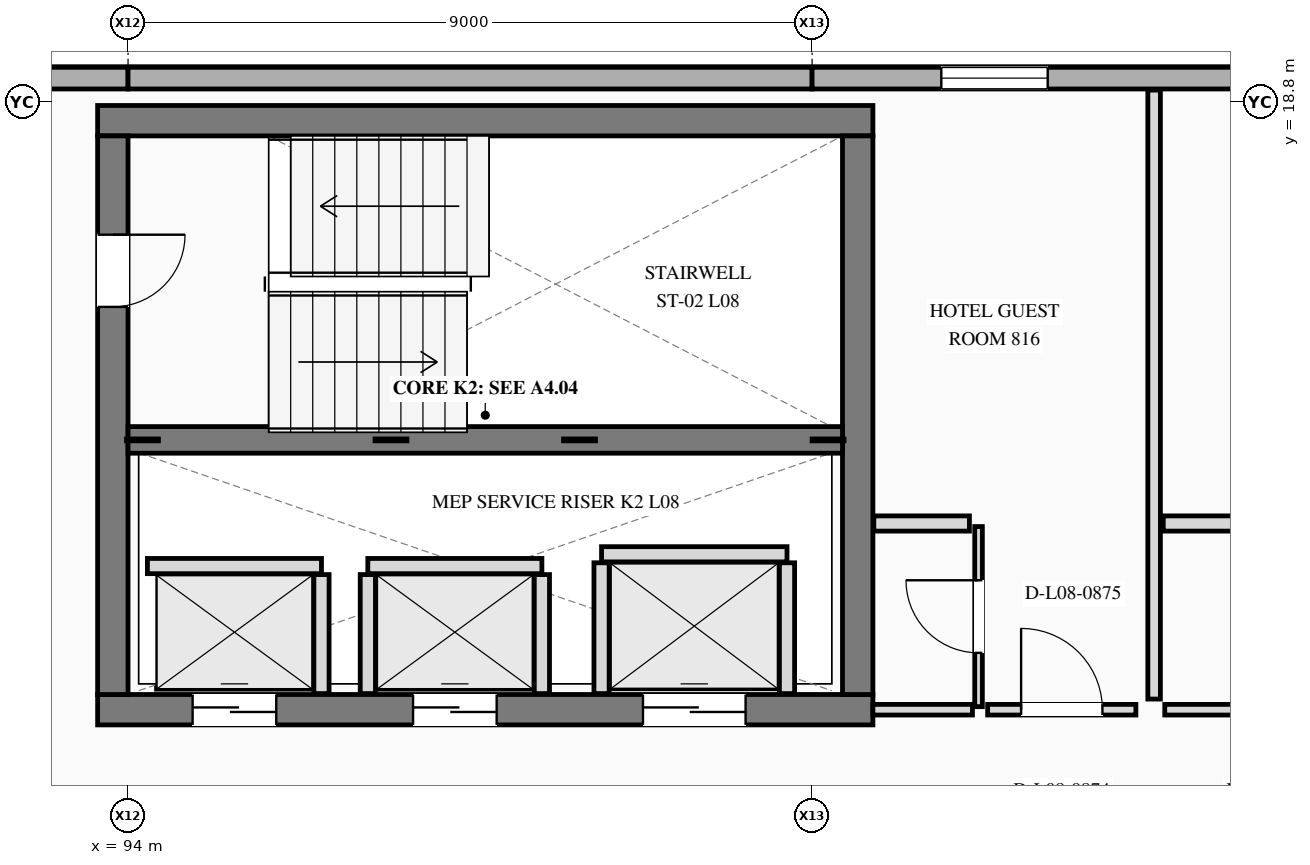
"""IFC4 building model, lengths in metres.
Left out: names, types, materials, properties, quantities, classifications, styles, units other than length and angle.
Written with IfcOpenShell. Run it as: python <this file> out.ifc"""

import sys

from ifc_helpers import new_model, si_unit, direction, frame, frame_2d, origin, place, context, subcontext, project, spatial, rectangle, extrude, element, fill, save


model = new_model("IFC4")
c1 = context("Model", 3, precision=1e-05, world=origin(), true_north=direction((0.0, 1.0)))
c2 = subcontext(c1, "Body", "Model", "MODEL_VIEW")
j1 = project(units=[si_unit("LENGTHUNIT", "METRE"), si_unit("PLANEANGLEUNIT", "RADIAN")], contexts=[c1])
p1 = place(None, origin())
s1 = spatial("IfcSite", under=j1, at=p1, CompositionType="ELEMENT")
p2 = place(p1, origin())
s2 = spatial("IfcBuilding", under=s1, at=p2, CompositionType="ELEMENT")
p3 = place(p2, frame((0.0, 0.0, 34.1)))
s3 = spatial("IfcBuildingStorey", under=s2, at=p3, CompositionType="ELEMENT", Elevation=34.1)
for number, where, z_axis, x_axis in (
    (1, (94.0, 19.11, 0.0), (0.0, 0.0, 1.0), (-1.0, 0.0, 0.0)),
    (2, (103.0, 19.11, 0.0), (0.0, 0.0, 1.0), (-1.0, 0.0, 0.0)),
):
    element("IfcWall", number, at=place(p3, frame(where, z_axis=z_axis, x_axis=x_axis)), inside=s3, PredefinedType="STANDARD", context=c2, shape_type="SweptSolid", body=[
        extrude(rectangle(XDim=9.0, YDim=0.285, at=frame_2d((4.5, 0.0))), origin(), (0.0, 0.0, 1.0), 3.5),
    ])
p4 = place(p3, frame((112.0, 19.11, 0.0), z_axis=(0.0, 0.0, 1.0), x_axis=(-1.0, 0.0, 0.0)))
e3 = element("IfcWall", 3, at=p4, inside=s3, PredefinedType="STANDARD", context=c2, shape_type="SweptSolid", body=[
    extrude(rectangle(XDim=9.0, YDim=0.285, at=frame_2d((4.5, 0.0))), origin(), (0.0, 0.0, 1.0), 3.5),
])
p5 = place(p4, frame((5.9, 0.0, 0.85)))
e4 = element("IfcOpeningElement", 4, at=p5, cuts=e3, PredefinedType="OPENING", context=c2, shape_type="SweptSolid", body=[
    extrude(rectangle(XDim=1.4, YDim=1.55, at=frame_2d((0.7, 0.775))), frame((0.0, 0.152, 0.0), z_axis=(0.0, -1.0, 0.0), x_axis=(1.0, 0.0, 0.0)), (0.0, 0.0, 1.0), 0.305),
])
p6 = place(p4, frame((1.725, 0.0, 0.85)))
e5 = element("IfcOpeningElement", 5, at=p6, cuts=e3, PredefinedType="OPENING", context=c2, shape_type="SweptSolid", body=[
    extrude(rectangle(XDim=1.35, YDim=1.65, at=frame_2d((0.675, 0.825))), frame((0.0, 0.152, 0.0), z_axis=(0.0, -1.0, 0.0), x_axis=(1.0, 0.0, 0.0)), (0.0, 0.0, 1.0), 0.305),
])
p7 = place(p3, frame((93.6, 10.8, 0.0), z_axis=(0.0, 0.0, 1.0), x_axis=(1.0, 0.0, 0.0)))
e6 = element("IfcWall", 6, at=p7, inside=s3, PredefinedType="SHEAR", context=c2, shape_type="SweptSolid", body=[
    extrude(rectangle(XDim=10.2, YDim=0.4, at=frame_2d((5.1, 0.0))), origin(), (0.0, 0.0, 1.0), 3.5),
])
p8 = place(p7, frame((1.25, 0.0, 0.0)))
e7 = element("IfcOpeningElement", 7, at=p8, cuts=e6, PredefinedType="OPENING", context=c2, shape_type="SweptSolid", body=[
    extrude(rectangle(XDim=1.1, YDim=2.2, at=frame_2d((0.55, 1.1))), frame((0.0, 0.21, 0.0), z_axis=(0.0, -1.0, 0.0), x_axis=(1.0, 0.0, 0.0)), (0.0, 0.0, 1.0), 0.42),
])
p9 = place(p7, frame((4.15, 0.0, 0.0)))
e8 = element("IfcOpeningElement", 8, at=p9, cuts=e6, PredefinedType="OPENING", context=c2, shape_type="SweptSolid", body=[
    extrude(rectangle(XDim=1.1, YDim=2.2, at=frame_2d((0.55, 1.1))), frame((0.0, 0.21, 0.0), z_axis=(0.0, -1.0, 0.0), x_axis=(1.0, 0.0, 0.0)), (0.0, 0.0, 1.0), 0.42),
])
p10 = place(p7, frame((7.175, 0.0, 0.0)))
e9 = element("IfcOpeningElement", 9, at=p10, cuts=e6, PredefinedType="OPENING", context=c2, shape_type="SweptSolid", body=[
    extrude(rectangle(XDim=1.35, YDim=2.3, at=frame_2d((0.675, 1.15))), frame((0.0, 0.21, 0.0), z_axis=(0.0, -1.0, 0.0), x_axis=(1.0, 0.0, 0.0)), (0.0, 0.0, 1.0), 0.42),
])
p11 = place(p3, frame((103.8, 18.55, 0.0), z_axis=(0.0, 0.0, 1.0), x_axis=(-1.0, 0.0, 0.0)))
e10 = element("IfcWall", 10, at=p11, inside=s3, PredefinedType="SHEAR", context=c2, shape_type="SweptSolid", body=[
    extrude(rectangle(XDim=10.2, YDim=0.4, at=frame_2d((5.1, 0.0))), origin(), (0.0, 0.0, 1.0), 3.5),
])
p12 = place(p3, frame((93.8, 18.35, 0.0), z_axis=(0.0, 0.0, 1.0), x_axis=(0.0, -1.0, 0.0)))
e11 = element("IfcWall", 11, at=p12, inside=s3, PredefinedType="SHEAR", context=c2, shape_type="SweptSolid", body=[
    extrude(rectangle(XDim=7.35, YDim=0.4, at=frame_2d((3.675, 0.0))), origin(), (0.0, 0.0, 1.0), 3.5),
])
p13 = place(p12, frame((1.3, 0.0, 0.0)))
e12 = element("IfcOpeningElement", 12, at=p13, cuts=e11, PredefinedType="OPENING", context=c2, shape_type="SweptSolid", body=[
    extrude(rectangle(XDim=0.95, YDim=2.2, at=frame_2d((0.475, 1.1))), frame((0.0, 0.21, 0.0), z_axis=(0.0, -1.0, 0.0), x_axis=(1.0, 0.0, 0.0)), (0.0, 0.0, 1.0), 0.42),
])
p14 = place(p3, frame((103.6, 11.0, 0.0), z_axis=(0.0, 0.0, 1.0), x_axis=(0.0, 1.0, 0.0)))
e13 = element("IfcWall", 13, at=p14, inside=s3, PredefinedType="SHEAR", context=c2, shape_type="SweptSolid", body=[
    extrude(rectangle(XDim=7.35, YDim=0.4, at=frame_2d((3.675, 0.0))), origin(), (0.0, 0.0, 1.0), 3.5),
])
p15 = place(p3, frame((94.0, 14.35, 0.0), z_axis=(0.0, 0.0, 1.0), x_axis=(1.0, 0.0, 0.0)))
e14 = element("IfcWall", 14, at=p15, inside=s3, PredefinedType="SHEAR", context=c2, shape_type="SweptSolid", body=[
    extrude(rectangle(XDim=9.4, YDim=0.35, at=frame_2d((4.7, 0.0))), origin(), (0.0, 0.0, 1.0), 3.5),
])
p16 = place(p3, frame((94.255, 12.69, 0.0), z_axis=(0.0, 0.0, 1.0), x_axis=(1.0, 0.0, 0.0)))
e15 = element("IfcWall", 15, at=p16, inside=s3, PredefinedType="PLUMBINGWALL", context=c2, shape_type="SweptSolid", body=[
    extrude(rectangle(XDim=2.29, YDim=0.2, at=frame_2d((1.145, 0.0))), origin(), (0.0, 0.0, 1.0), 3.19),
])
p17 = place(p3, frame((96.545, 11.012, 0.0), z_axis=(0.0, 0.0, 1.0), x_axis=(0.0, 1.0, 0.0)))
e16 = element("IfcWall", 16, at=p17, inside=s3, PredefinedType="PLUMBINGWALL", context=c2, shape_type="SweptSolid", body=[
    extrude(rectangle(XDim=1.566, YDim=0.2, at=frame_2d((0.783, 0.0))), origin(), (0.0, 0.0, 1.0), 3.19),
])
p18 = place(p3, frame((97.155, 12.69, 0.0), z_axis=(0.0, 0.0, 1.0), x_axis=(1.0, 0.0, 0.0)))
e17 = element("IfcWall", 17, at=p18, inside=s3, PredefinedType="PLUMBINGWALL", context=c2, shape_type="SweptSolid", body=[
    extrude(rectangle(XDim=2.29, YDim=0.2, at=frame_2d((1.145, 0.0))), origin(), (0.0, 0.0, 1.0), 3.19),
])
for number, where, z_axis, x_axis in (
    (18, (97.155, 11.012, 0.0), (0.0, 0.0, 1.0), (0.0, 1.0, 0.0)),
    (19, (99.445, 11.012, 0.0), (0.0, 0.0, 1.0), (0.0, 1.0, 0.0)),
):
    element("IfcWall", number, at=place(p3, frame(where, z_axis=z_axis, x_axis=x_axis)), inside=s3, PredefinedType="PLUMBINGWALL", context=c2, shape_type="SweptSolid", body=[
        extrude(rectangle(XDim=1.566, YDim=0.2, at=frame_2d((0.783, 0.0))), origin(), (0.0, 0.0, 1.0), 3.19),
    ])
p19 = place(p3, frame((100.23, 12.845, 0.0), z_axis=(0.0, 0.0, 1.0), x_axis=(1.0, 0.0, 0.0)))
e20 = element("IfcWall", 20, at=p19, inside=s3, PredefinedType="PLUMBINGWALL", context=c2, shape_type="SweptSolid", body=[
    extrude(rectangle(XDim=2.44, YDim=0.2, at=frame_2d((1.22, 0.0))), origin(), (0.0, 0.0, 1.0), 3.19),
])
for number, where, z_axis, x_axis in (
    (21, (100.23, 11.012, 0.0), (0.0, 0.0, 1.0), (0.0, 1.0, 0.0)),
    (22, (102.67, 11.012, 0.0), (0.0, 0.0, 1.0), (0.0, 1.0, 0.0)),
):
    element("IfcWall", number, at=place(p3, frame(where, z_axis=z_axis, x_axis=x_axis)), inside=s3, PredefinedType="PLUMBINGWALL", context=c2, shape_type="SweptSolid", body=[
        extrude(rectangle(XDim=1.721, YDim=0.2, at=frame_2d((0.86, 0.0))), origin(), (0.0, 0.0, 1.0), 3.19),
    ])
p20 = place(p3, frame((103.8, 10.8, 0.0), z_axis=(0.0, 0.0, 1.0), x_axis=(1.0, 0.0, 0.0)))
e23 = element("IfcWall", 23, at=p20, inside=s3, PredefinedType="PARTITIONING", context=c2, shape_type="SweptSolid", body=[
    extrude(rectangle(XDim=1.31, YDim=0.14, at=frame_2d((0.655, 0.0))), origin(), (0.0, 0.0, 1.0), 3.19),
])
p21 = place(p3, frame((105.31, 10.8, 0.0), z_axis=(0.0, 0.0, 1.0), x_axis=(1.0, 0.0, 0.0)))
e24 = element("IfcWall", 24, at=p21, inside=s3, PredefinedType="PARTITIONING", context=c2, shape_type="SweptSolid", body=[
    extrude(rectangle(XDim=1.95, YDim=0.14, at=frame_2d((0.975, 0.0))), origin(), (0.0, 0.0, 1.0), 3.19),
])
p22 = place(p21, frame((0.44, 0.0, 0.0)))
e25 = element("IfcOpeningElement", 25, at=p22, cuts=e24, PredefinedType="OPENING", context=c2, shape_type="SweptSolid", body=[
    extrude(rectangle(XDim=1.07, YDim=2.4, at=frame_2d((0.535, 1.2))), frame((0.0, 0.08, 0.0), z_axis=(0.0, -1.0, 0.0), x_axis=(1.0, 0.0, 0.0)), (0.0, 0.0, 1.0), 0.16),
])
p23 = place(p3, frame((107.5, 10.94, 0.0), z_axis=(0.0, 0.0, 1.0), x_axis=(0.0, 1.0, 0.0)))
e26 = element("IfcWall", 26, at=p23, inside=s3, PredefinedType="PARTITIONING", context=c2, shape_type="SweptSolid", body=[
    extrude(rectangle(XDim=8.012, YDim=0.165, at=frame_2d((4.006, 0.0))), origin(), (0.0, 0.0, 1.0), 3.19),
])
p24 = place(p3, frame((105.19, 10.84, 0.0), z_axis=(0.0, 0.0, 1.0), x_axis=(0.0, 1.0, 0.0)))
e27 = element("IfcWall", 27, at=p24, inside=s3, PredefinedType="PARTITIONING", context=c2, shape_type="SweptSolid", body=[
    extrude(rectangle(XDim=2.37, YDim=0.1, at=frame_2d((1.185, 0.0))), origin(), (0.0, 0.0, 1.0), 3.19),
])
p25 = place(p24, frame((0.708, 0.0, 0.0)))
e28 = element("IfcOpeningElement", 28, at=p25, cuts=e27, PredefinedType="OPENING", context=c2, shape_type="SweptSolid", body=[
    extrude(rectangle(XDim=0.955, YDim=2.22, at=frame_2d((0.478, 1.11))), frame((0.0, 0.06, 0.0), z_axis=(0.0, -1.0, 0.0), x_axis=(1.0, 0.0, 0.0)), (0.0, 0.0, 1.0), 0.12),
])
p26 = place(p3, frame((103.812, 13.25, 0.0), z_axis=(0.0, 0.0, 1.0), x_axis=(1.0, 0.0, 0.0)))
e29 = element("IfcWall", 29, at=p26, inside=s3, PredefinedType="PLUMBINGWALL", context=c2, shape_type="SweptSolid", body=[
    extrude(rectangle(XDim=1.258, YDim=0.2, at=frame_2d((0.629, 0.0))), origin(), (0.0, 0.0, 1.0), 3.19),
])
p27 = place(p3, frame((107.64, 10.8, 0.0), z_axis=(0.0, 0.0, 1.0), x_axis=(1.0, 0.0, 0.0)))
e30 = element("IfcWall", 30, at=p27, inside=s3, PredefinedType="PARTITIONING", context=c2, shape_type="SweptSolid", body=[
    extrude(rectangle(XDim=1.67, YDim=0.14, at=frame_2d((0.835, 0.0))), origin(), (0.0, 0.0, 1.0), 3.19),
])
p28 = place(p3, frame((107.62, 13.25, 0.0), z_axis=(0.0, 0.0, 1.0), x_axis=(1.0, 0.0, 0.0)))
e31 = element("IfcWall", 31, at=p28, inside=s3, PredefinedType="PLUMBINGWALL", context=c2, shape_type="SweptSolid", body=[
    extrude(rectangle(XDim=1.65, YDim=0.2, at=frame_2d((0.825, 0.0))), origin(), (0.0, 0.0, 1.0), 3.19),
])
p29 = place(p5, origin())
e32 = element("IfcWindow", 32, at=p29, inside=s3, PartitioningType="SINGLE_PANEL", PredefinedType="WINDOW", context=c2, shape_type="SweptSolid", body=[
    extrude(rectangle(XDim=1.4, YDim=1.55, at=frame_2d((0.7, 0.775))), frame((0.0, 0.03, 0.0), z_axis=(0.0, -1.0, 0.0), x_axis=(1.0, 0.0, 0.0)), (0.0, 0.0, 1.0), 0.06),
])
fill(e4, e32)
p30 = place(p13, origin())
e33 = element("IfcDoor", 33, at=p30, inside=s3, OperationType="SINGLE_SWING_LEFT", PredefinedType="DOOR", context=c2, shape_type="SweptSolid", body=[
    extrude(rectangle(XDim=0.95, YDim=2.2, at=frame_2d((0.475, 1.1))), frame((0.0, 0.025, 0.0), z_axis=(0.0, -1.0, 0.0), x_axis=(1.0, 0.0, 0.0)), (0.0, 0.0, 1.0), 0.05),
])
fill(e12, e33)
p31 = place(p8, origin())
e34 = element("IfcDoor", 34, at=p31, inside=s3, OperationType="SLIDING_TO_LEFT", PredefinedType="DOOR", context=c2, shape_type="SweptSolid", body=[
    extrude(rectangle(XDim=1.1, YDim=2.2, at=frame_2d((0.55, 1.1))), frame((0.0, 0.025, 0.0), z_axis=(0.0, -1.0, 0.0), x_axis=(1.0, 0.0, 0.0)), (0.0, 0.0, 1.0), 0.05),
])
fill(e7, e34)
p32 = place(p9, origin())
e35 = element("IfcDoor", 35, at=p32, inside=s3, OperationType="SLIDING_TO_RIGHT", PredefinedType="DOOR", context=c2, shape_type="SweptSolid", body=[
    extrude(rectangle(XDim=1.1, YDim=2.2, at=frame_2d((0.55, 1.1))), frame((0.0, 0.025, 0.0), z_axis=(0.0, -1.0, 0.0), x_axis=(1.0, 0.0, 0.0)), (0.0, 0.0, 1.0), 0.05),
])
fill(e8, e35)
p33 = place(p10, origin())
e36 = element("IfcDoor", 36, at=p33, inside=s3, OperationType="SLIDING_TO_LEFT", PredefinedType="DOOR", context=c2, shape_type="SweptSolid", body=[
    extrude(rectangle(XDim=1.35, YDim=2.3, at=frame_2d((0.675, 1.15))), frame((0.0, 0.025, 0.0), z_axis=(0.0, -1.0, 0.0), x_axis=(1.0, 0.0, 0.0)), (0.0, 0.0, 1.0), 0.05),
])
fill(e9, e36)
p34 = place(p22, origin())
e37 = element("IfcDoor", 37, at=p34, inside=s3, OperationType="SINGLE_SWING_LEFT", PredefinedType="DOOR", context=c2, shape_type="SweptSolid", body=[
    extrude(rectangle(XDim=1.07, YDim=2.4, at=frame_2d((0.535, 1.2))), frame((0.0, 0.025, 0.0), z_axis=(0.0, -1.0, 0.0), x_axis=(1.0, 0.0, 0.0)), (0.0, 0.0, 1.0), 0.05),
])
fill(e25, e37)
p35 = place(p25, origin())
e38 = element("IfcDoor", 38, at=p35, inside=s3, OperationType="SINGLE_SWING_RIGHT", PredefinedType="DOOR", context=c2, shape_type="SweptSolid", body=[
    extrude(rectangle(XDim=0.955, YDim=2.22, at=frame_2d((0.478, 1.11))), frame((0.0, 0.025, 0.0), z_axis=(0.0, -1.0, 0.0), x_axis=(1.0, 0.0, 0.0)), (0.0, 0.0, 1.0), 0.05),
])
fill(e28, e38)
save(model, sys.argv[1])
